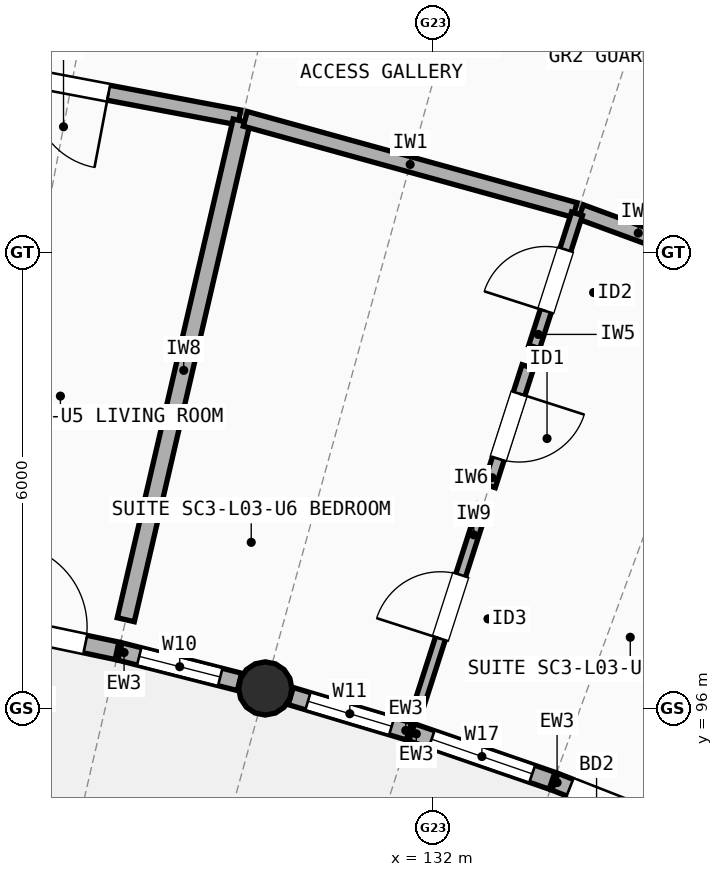
"""IFC4 building model, lengths in metres.
Left out: names, types, materials, properties, quantities, classifications, styles, units other than length and angle.
Written with IfcOpenShell. Run it as: python <this file> out.ifc"""

import sys

from ifc_helpers import new_model, si_unit, direction, frame, frame_2d, origin, origin_2d, place, context, subcontext, project, spatial, rectangle, circle, extrude, element, fill, save


model = new_model("IFC4")
c1 = context("Model", 3, precision=1e-05, world=origin(), true_north=direction((0.0, 1.0)))
c2 = subcontext(c1, "Body", "Model", "MODEL_VIEW")
j1 = project(units=[si_unit("LENGTHUNIT", "METRE"), si_unit("PLANEANGLEUNIT", "RADIAN")], contexts=[c1])
p1 = place(None, origin())
s1 = spatial("IfcSite", under=j1, at=p1, CompositionType="ELEMENT")
p2 = place(p1, origin())
s2 = spatial("IfcBuilding", under=s1, at=p2, CompositionType="ELEMENT")
p3 = place(p2, frame((0.0, 0.0, 10.9)))
s3 = spatial("IfcBuildingStorey", under=s2, at=p3, CompositionType="ELEMENT", Elevation=10.9)
p4 = place(p3, frame((129.795, 96.263, 0.0), z_axis=(0.0, 0.0, 1.0), x_axis=(1.0, 0.0, 0.0)))
e1 = element("IfcColumn", 1, at=p4, inside=s3, PredefinedType="COLUMN", context=c2, shape_type="SweptSolid", body=[
    extrude(circle(Radius=0.35, at=origin_2d()), origin(), (0.0, 0.0, 1.0), 2.948),
])
p5 = place(p3, frame((125.934, 97.161, 0.0), z_axis=(0.0, 0.0, 1.0), x_axis=(0.978533860292, -0.206086108851, 0.0)))
e2 = element("IfcWall", 2, at=p5, inside=s3, PredefinedType="STANDARD", context=c2, shape_type="SweptSolid", body=[
    extrude(rectangle(XDim=1.952, YDim=0.235, at=frame_2d((0.976, 0.0))), origin(), (0.0, 0.0, 1.0), 2.684),
])
p6 = place(p5, frame((0.426, 0.0, 0.0)))
e3 = element("IfcOpeningElement", 3, at=p6, cuts=e2, PredefinedType="OPENING", context=c2, shape_type="SweptSolid", body=[
    extrude(rectangle(XDim=1.1, YDim=2.15, at=frame_2d((0.55, 1.075))), frame((0.0, 0.127, 0.0), z_axis=(0.0, -1.0, 0.0), x_axis=(1.0, 0.0, 0.0)), (0.0, 0.0, 1.0), 0.255),
])
p7 = place(p3, frame((127.883, 96.75, 0.0), z_axis=(0.0, 0.0, 1.0), x_axis=(0.969142943716, -0.246499400902, 0.0)))
e4 = element("IfcWall", 4, at=p7, inside=s3, PredefinedType="STANDARD", context=c2, shape_type="SweptSolid", body=[
    extrude(rectangle(XDim=1.622, YDim=0.235, at=frame_2d((0.811, 0.0))), origin(), (0.0, 0.0, 1.0), 2.684),
])
p8 = place(p7, frame((0.261, 0.0, 0.85)))
e5 = element("IfcOpeningElement", 5, at=p8, cuts=e4, PredefinedType="OPENING", context=c2, shape_type="SweptSolid", body=[
    extrude(rectangle(XDim=1.1, YDim=1.45, at=frame_2d((0.55, 0.725))), frame((0.0, 0.127, 0.0), z_axis=(0.0, -1.0, 0.0), x_axis=(1.0, 0.0, 0.0)), (0.0, 0.0, 1.0), 0.255),
])
p9 = place(p3, frame((130.13, 96.163, 0.0), z_axis=(0.0, 0.0, 1.0), x_axis=(0.958078548486, -0.286505662999, 0.0)))
e6 = element("IfcWall", 6, at=p9, inside=s3, PredefinedType="STANDARD", context=c2, shape_type="SweptSolid", body=[
    extrude(rectangle(XDim=1.623, YDim=0.235, at=frame_2d((0.811, 0.0))), origin(), (0.0, 0.0, 1.0), 2.684),
])
p10 = place(p9, frame((0.236, 0.0, 0.85)))
e7 = element("IfcOpeningElement", 7, at=p10, cuts=e6, PredefinedType="OPENING", context=c2, shape_type="SweptSolid", body=[
    extrude(rectangle(XDim=1.15, YDim=1.45, at=frame_2d((0.575, 0.725))), frame((0.0, 0.127, 0.0), z_axis=(0.0, -1.0, 0.0), x_axis=(1.0, 0.0, 0.0)), (0.0, 0.0, 1.0), 0.255),
])
p11 = place(p3, frame((131.722, 95.686, 0.0), z_axis=(0.0, 0.0, 1.0), x_axis=(0.945368994877, -0.326002244662, 0.0)))
e8 = element("IfcWall", 8, at=p11, inside=s3, PredefinedType="STANDARD", context=c2, shape_type="SweptSolid", body=[
    extrude(rectangle(XDim=1.952, YDim=0.235, at=frame_2d((0.976, 0.0))), origin(), (0.0, 0.0, 1.0), 2.684),
])
p12 = place(p11, frame((0.276, 0.0, 0.85)))
e9 = element("IfcOpeningElement", 9, at=p12, cuts=e8, PredefinedType="OPENING", context=c2, shape_type="SweptSolid", body=[
    extrude(rectangle(XDim=1.4, YDim=1.5, at=frame_2d((0.7, 0.75))), frame((0.0, 0.127, 0.0), z_axis=(0.0, -1.0, 0.0), x_axis=(1.0, 0.0, 0.0)), (0.0, 0.0, 1.0), 0.255),
])
p13 = place(p3, frame((133.606, 95.036, 0.0), z_axis=(0.0, 0.0, 1.0), x_axis=(0.931038371221, -0.364921294684, 0.0)))
e10 = element("IfcWall", 10, at=p13, inside=s3, PredefinedType="STANDARD", context=c2, shape_type="SweptSolid", body=[
    extrude(rectangle(XDim=1.622, YDim=0.235, at=frame_2d((0.811, 0.0))), origin(), (0.0, 0.0, 1.0), 2.684),
])
p14 = place(p13, frame((0.211, 0.0, 0.0)))
e11 = element("IfcOpeningElement", 11, at=p14, cuts=e10, PredefinedType="OPENING", context=c2, shape_type="SweptSolid", body=[
    extrude(rectangle(XDim=1.2, YDim=2.15, at=frame_2d((0.6, 1.075))), frame((0.0, 0.127, 0.0), z_axis=(0.0, -1.0, 0.0), x_axis=(1.0, 0.0, 0.0)), (0.0, 0.0, 1.0), 0.255),
])
p15 = place(p3, frame((125.031, 104.611, 0.0), z_axis=(0.0, 0.0, 1.0), x_axis=(0.982595404078, -0.18575863879, 0.0)))
e12 = element("IfcWall", 12, at=p15, inside=s3, PredefinedType="SOLIDWALL", context=c2, shape_type="SweptSolid", body=[
    extrude(rectangle(XDim=4.501, YDim=0.2, at=frame_2d((2.251, 0.0))), origin(), (0.0, 0.0, 1.0), 2.722),
])
p16 = place(p15, frame((1.751, 0.0, 0.0)))
e13 = element("IfcOpeningElement", 13, at=p16, cuts=e12, PredefinedType="OPENING", context=c2, shape_type="SweptSolid", body=[
    extrude(rectangle(XDim=1.0, YDim=2.15, at=frame_2d((0.5, 1.075))), frame((0.0, 0.11, 0.0), z_axis=(0.0, -1.0, 0.0), x_axis=(1.0, 0.0, 0.0)), (0.0, 0.0, 1.0), 0.22),
])
p17 = place(p3, frame((127.96, 97.167, 0.0), z_axis=(0.0, 0.0, 1.0), x_axis=(0.226349561734, 0.974046136434, 0.0)))
e14 = element("IfcWall", 14, at=p17, inside=s3, PredefinedType="SOLIDWALL", context=c2, shape_type="SweptSolid", body=[
    extrude(rectangle(XDim=6.736, YDim=0.23, at=frame_2d((3.368, 0.0))), origin(), (0.0, 0.0, 1.0), 2.742),
])
p18 = place(p3, frame((129.532, 103.757, 0.0), z_axis=(0.0, 0.0, 1.0), x_axis=(0.963830390038, -0.266516377055, 0.0)))
e15 = element("IfcWall", 15, at=p18, inside=s3, PredefinedType="SOLIDWALL", context=c2, shape_type="SweptSolid", body=[
    extrude(rectangle(XDim=4.501, YDim=0.2, at=frame_2d((2.251, 0.0))), origin(), (0.0, 0.0, 1.0), 2.762),
])
p19 = place(p3, frame((133.947, 102.533, 0.0), z_axis=(0.0, 0.0, 1.0), x_axis=(0.93839218154, -0.345572154006, 0.0)))
e16 = element("IfcWall", 16, at=p19, inside=s3, PredefinedType="SOLIDWALL", context=c2, shape_type="SweptSolid", body=[
    extrude(rectangle(XDim=4.502, YDim=0.2, at=frame_2d((2.251, 0.0))), origin(), (0.0, 0.0, 1.0), 2.742),
])
p20 = place(p19, frame((1.761, 0.0, 0.0)))
e17 = element("IfcOpeningElement", 17, at=p20, cuts=e16, PredefinedType="OPENING", context=c2, shape_type="SweptSolid", body=[
    extrude(rectangle(XDim=0.98, YDim=2.15, at=frame_2d((0.49, 1.075))), frame((0.0, 0.11, 0.0), z_axis=(0.0, -1.0, 0.0), x_axis=(1.0, 0.0, 0.0)), (0.0, 0.0, 1.0), 0.22),
])
p21 = place(p3, frame((131.804, 96.005, 0.0), z_axis=(0.0, 0.0, 1.0), x_axis=(0.306243449584, 0.951953228676, 0.0)))
e18 = element("IfcWall", 18, at=p21, inside=s3, PredefinedType="PARTITIONING", context=c2, shape_type="SweptSolid", body=[
    extrude(rectangle(XDim=2.8, YDim=0.135, at=frame_2d((1.4, 0.0))), origin(), (0.0, 0.0, 1.0), 2.722),
])
p22 = place(p21, frame((0.96, 0.0, 0.0)))
e19 = element("IfcOpeningElement", 19, at=p22, cuts=e18, PredefinedType="OPENING", context=c2, shape_type="SweptSolid", body=[
    extrude(rectangle(XDim=0.88, YDim=2.1, at=frame_2d((0.44, 1.05))), frame((0.0, 0.077, 0.0), z_axis=(0.0, -1.0, 0.0), x_axis=(1.0, 0.0, 0.0)), (0.0, 0.0, 1.0), 0.155),
])
p23 = place(p3, frame((132.745, 98.929, 0.0), z_axis=(0.0, 0.0, 1.0), x_axis=(0.306388026226, 0.95190670624, 0.0)))
e20 = element("IfcWall", 20, at=p23, inside=s3, PredefinedType="PLUMBINGWALL", context=c2, shape_type="SweptSolid", body=[
    extrude(rectangle(XDim=1.648, YDim=0.16, at=frame_2d((0.824, 0.0))), origin(), (0.0, 0.0, 1.0), 2.722),
])
p24 = place(p23, frame((0.374, 0.0, 0.0)))
e21 = element("IfcOpeningElement", 21, at=p24, cuts=e20, PredefinedType="OPENING", context=c2, shape_type="SweptSolid", body=[
    extrude(rectangle(XDim=0.9, YDim=2.1, at=frame_2d((0.45, 1.05))), frame((0.0, 0.09, 0.0), z_axis=(0.0, -1.0, 0.0), x_axis=(1.0, 0.0, 0.0)), (0.0, 0.0, 1.0), 0.18),
])
p25 = place(p3, frame((133.333, 100.757, 0.0), z_axis=(0.0, 0.0, 1.0), x_axis=(0.306258297612, 0.951948451936, 0.0)))
e22 = element("IfcWall", 22, at=p25, inside=s3, PredefinedType="PARTITIONING", context=c2, shape_type="SweptSolid", body=[
    extrude(rectangle(XDim=1.84, YDim=0.15, at=frame_2d((0.92, 0.0))), origin(), (0.0, 0.0, 1.0), 2.722),
])
p26 = place(p25, frame((0.495, 0.0, 0.0)))
e23 = element("IfcOpeningElement", 23, at=p26, cuts=e22, PredefinedType="OPENING", context=c2, shape_type="SweptSolid", body=[
    extrude(rectangle(XDim=0.85, YDim=2.1, at=frame_2d((0.425, 1.05))), frame((0.0, 0.085, 0.0), z_axis=(0.0, -1.0, 0.0), x_axis=(1.0, 0.0, 0.0)), (0.0, 0.0, 1.0), 0.17),
])
p27 = place(p6, frame((1.1, 0.0, 0.0), z_axis=(0.0, 0.0, 1.0), x_axis=(-1.0, 0.0, 0.0)))
e24 = element("IfcDoor", 24, at=p27, inside=s3, OperationType="SINGLE_SWING_LEFT", PredefinedType="DOOR", context=c2, shape_type="SweptSolid", body=[
    extrude(rectangle(XDim=1.1, YDim=2.15, at=frame_2d((0.55, 1.075))), frame((0.0, 0.025, 0.0), z_axis=(0.0, -1.0, 0.0), x_axis=(1.0, 0.0, 0.0)), (0.0, 0.0, 1.0), 0.05),
])
fill(e3, e24)
p28 = place(p8, origin())
e25 = element("IfcWindow", 25, at=p28, inside=s3, PartitioningType="SINGLE_PANEL", PredefinedType="WINDOW", context=c2, shape_type="SweptSolid", body=[
    extrude(rectangle(XDim=1.1, YDim=1.45, at=frame_2d((0.55, 0.725))), frame((0.0, 0.03, 0.0), z_axis=(0.0, -1.0, 0.0), x_axis=(1.0, 0.0, 0.0)), (0.0, 0.0, 1.0), 0.06),
])
fill(e5, e25)
p29 = place(p10, origin())
e26 = element("IfcWindow", 26, at=p29, inside=s3, PartitioningType="SINGLE_PANEL", PredefinedType="WINDOW", context=c2, shape_type="SweptSolid", body=[
    extrude(rectangle(XDim=1.15, YDim=1.45, at=frame_2d((0.575, 0.725))), frame((0.0, 0.03, 0.0), z_axis=(0.0, -1.0, 0.0), x_axis=(1.0, 0.0, 0.0)), (0.0, 0.0, 1.0), 0.06),
])
fill(e7, e26)
p30 = place(p12, origin())
e27 = element("IfcWindow", 27, at=p30, inside=s3, PartitioningType="SINGLE_PANEL", PredefinedType="WINDOW", context=c2, shape_type="SweptSolid", body=[
    extrude(rectangle(XDim=1.4, YDim=1.5, at=frame_2d((0.7, 0.75))), frame((0.0, 0.03, 0.0), z_axis=(0.0, -1.0, 0.0), x_axis=(1.0, 0.0, 0.0)), (0.0, 0.0, 1.0), 0.06),
])
fill(e9, e27)
p31 = place(p14, frame((1.2, 0.0, 0.0), z_axis=(0.0, 0.0, 1.0), x_axis=(-1.0, 0.0, 0.0)))
e28 = element("IfcDoor", 28, at=p31, inside=s3, OperationType="SINGLE_SWING_RIGHT", PredefinedType="DOOR", context=c2, shape_type="SweptSolid", body=[
    extrude(rectangle(XDim=1.2, YDim=2.15, at=frame_2d((0.6, 1.075))), frame((0.0, 0.025, 0.0), z_axis=(0.0, -1.0, 0.0), x_axis=(1.0, 0.0, 0.0)), (0.0, 0.0, 1.0), 0.05),
])
fill(e11, e28)
p32 = place(p16, origin())
e29 = element("IfcDoor", 29, at=p32, inside=s3, OperationType="SINGLE_SWING_RIGHT", PredefinedType="DOOR", context=c2, shape_type="SweptSolid", body=[
    extrude(rectangle(XDim=1.0, YDim=2.15, at=frame_2d((0.5, 1.075))), frame((0.0, 0.025, 0.0), z_axis=(0.0, -1.0, 0.0), x_axis=(1.0, 0.0, 0.0)), (0.0, 0.0, 1.0), 0.05),
])
fill(e13, e29)
p33 = place(p22, origin())
e30 = element("IfcDoor", 30, at=p33, inside=s3, OperationType="SINGLE_SWING_LEFT", PredefinedType="DOOR", context=c2, shape_type="SweptSolid", body=[
    extrude(rectangle(XDim=0.88, YDim=2.1, at=frame_2d((0.44, 1.05))), frame((0.0, 0.025, 0.0), z_axis=(0.0, -1.0, 0.0), x_axis=(1.0, 0.0, 0.0)), (0.0, 0.0, 1.0), 0.05),
])
fill(e19, e30)
p34 = place(p24, origin())
e31 = element("IfcDoor", 31, at=p34, inside=s3, OperationType="SINGLE_SWING_RIGHT", PredefinedType="DOOR", context=c2, shape_type="SweptSolid", body=[
    extrude(rectangle(XDim=0.9, YDim=2.1, at=frame_2d((0.45, 1.05))), frame((0.0, 0.025, 0.0), z_axis=(0.0, -1.0, 0.0), x_axis=(1.0, 0.0, 0.0)), (0.0, 0.0, 1.0), 0.05),
])
fill(e21, e31)
p35 = place(p26, origin())
e32 = element("IfcDoor", 32, at=p35, inside=s3, OperationType="SINGLE_SWING_LEFT", PredefinedType="DOOR", context=c2, shape_type="SweptSolid", body=[
    extrude(rectangle(XDim=0.85, YDim=2.1, at=frame_2d((0.425, 1.05))), frame((0.0, 0.025, 0.0), z_axis=(0.0, -1.0, 0.0), x_axis=(1.0, 0.0, 0.0)), (0.0, 0.0, 1.0), 0.05),
])
fill(e23, e32)
save(model, sys.argv[1])
